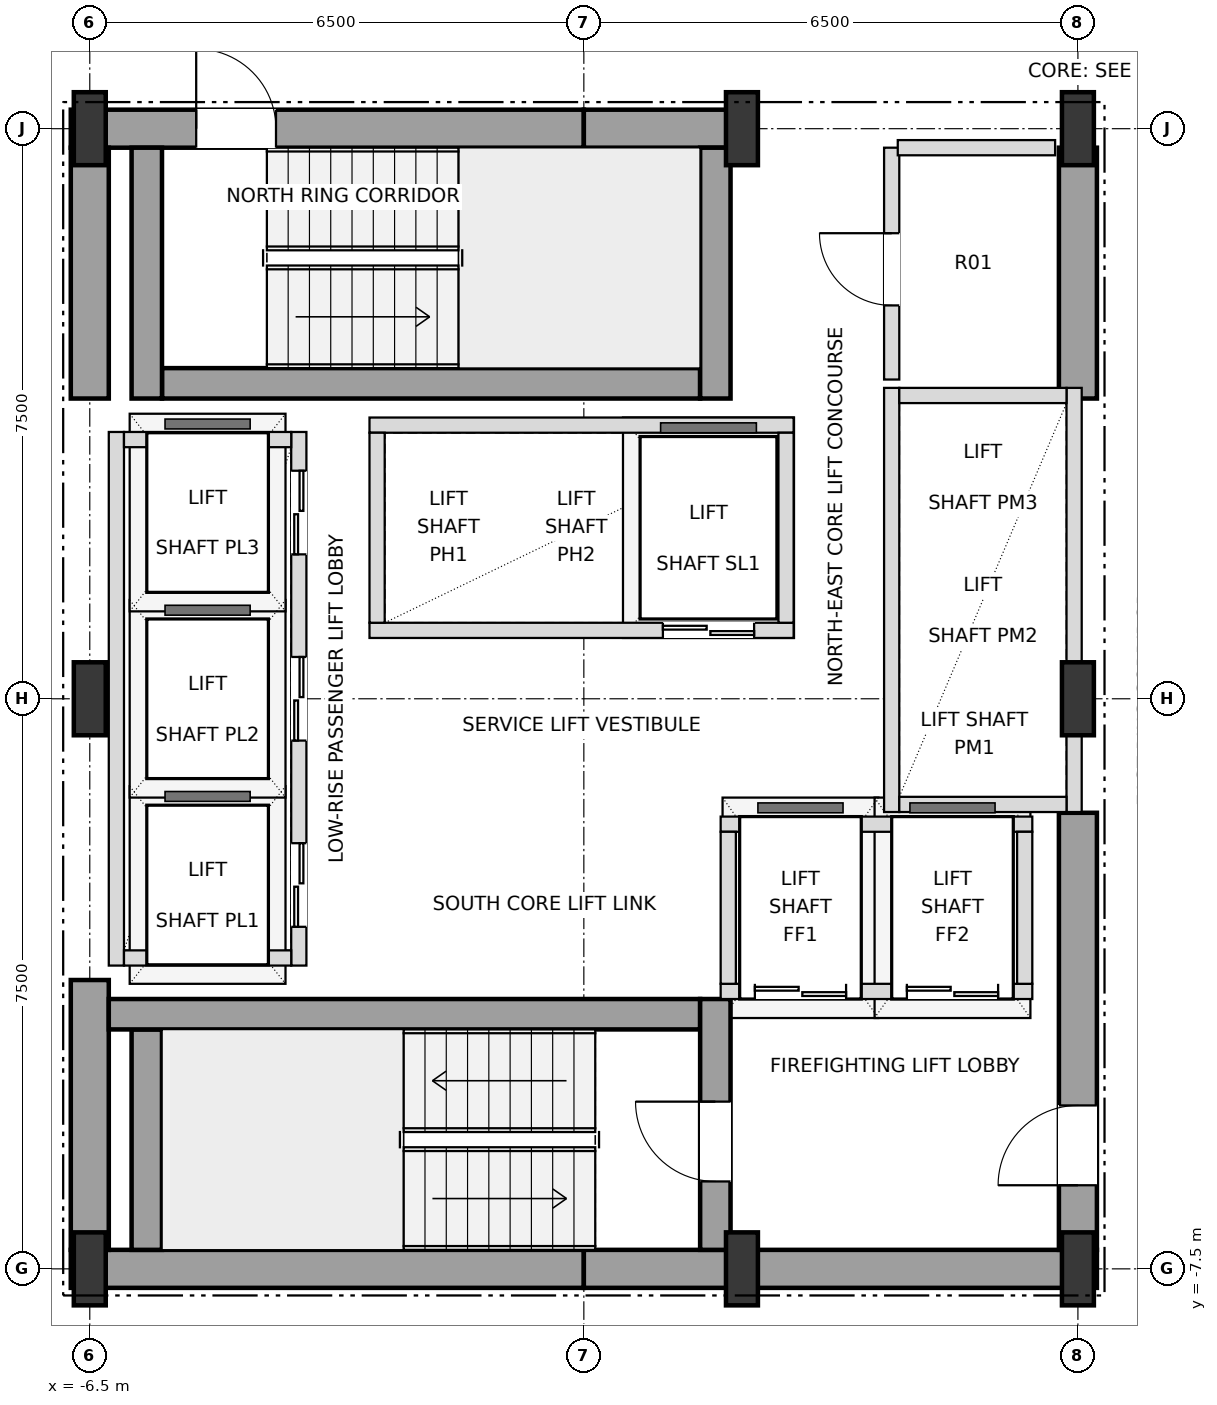
"""IFC4 building model, lengths in metres.
Left out: names, types, materials, properties, quantities, classifications, styles, units other than length and angle.
Written with IfcOpenShell. Run it as: python <this file> out.ifc"""

import sys

from ifc_helpers import new_model, si_unit, direction, frame, frame_2d, origin, origin_2d, place, context, subcontext, project, spatial, rectangle, i_section, extrude, element, fill, save


model = new_model("IFC4")
c1 = context("Model", 3, precision=1e-05, world=origin(), true_north=direction((0.0, 1.0)))
c2 = subcontext(c1, "Body", "Model", "MODEL_VIEW")
j1 = project(units=[si_unit("LENGTHUNIT", "METRE"), si_unit("PLANEANGLEUNIT", "RADIAN")], contexts=[c1])
p1 = place(None, origin())
s1 = spatial("IfcSite", under=j1, at=p1, CompositionType="ELEMENT")
p2 = place(p1, origin())
s2 = spatial("IfcBuilding", under=s1, at=p2, CompositionType="ELEMENT")
p3 = place(p2, frame((0.0, 0.0, 109.8)))
s3 = spatial("IfcBuildingStorey", under=s2, at=p3, CompositionType="ELEMENT", Elevation=109.8)
for number, where, z_axis, x_axis in (
    (1, (-6.5, -7.5, 0.0), (0.0, 0.0, 1.0), (1.0, 0.0, 0.0)),
    (2, (2.08, -7.5, 0.0), (0.0, 0.0, 1.0), (1.0, 0.0, 0.0)),
    (3, (6.5, -7.5, 0.0), (0.0, 0.0, 1.0), (1.0, 0.0, 0.0)),
    (4, (-6.5, 0.0, 0.0), (0.0, 0.0, 1.0), (1.0, 0.0, 0.0)),
    (5, (6.5, 0.0, 0.0), (0.0, 0.0, 1.0), (1.0, 0.0, 0.0)),
    (6, (-6.5, 7.5, 0.0), (0.0, 0.0, 1.0), (1.0, 0.0, 0.0)),
    (7, (2.08, 7.5, 0.0), (0.0, 0.0, 1.0), (1.0, 0.0, 0.0)),
    (8, (6.5, 7.5, 0.0), (0.0, 0.0, 1.0), (1.0, 0.0, 0.0)),
):
    element("IfcColumn", number, at=place(p3, frame(where, z_axis=z_axis, x_axis=x_axis)), inside=s3, PredefinedType="COLUMN", context=c2, shape_type="SweptSolid", body=[
        extrude(i_section(OverallWidth=0.42, OverallDepth=0.96, WebThickness=0.022, FlangeThickness=0.034, at=origin_2d()), origin(), (0.0, 0.0, 1.0), 3.6),
    ])
for number, where, z_axis, x_axis in (
    (9, (-6.75, -7.5, 0.0), (0.0, 0.0, 1.0), (1.0, 0.0, 0.0)),
    (10, (0.0, -7.5, 0.0), (0.0, 0.0, 1.0), (1.0, 0.0, 0.0)),
):
    element("IfcWall", number, at=place(p3, frame(where, z_axis=z_axis, x_axis=x_axis)), inside=s3, PredefinedType="SHEAR", context=c2, shape_type="SweptSolid", body=[
        extrude(rectangle(XDim=6.75, YDim=0.5, at=frame_2d((3.375, 0.0))), origin(), (0.0, 0.0, 1.0), 3.38),
    ])
p4 = place(p3, frame((-6.75, 7.5, 0.0), z_axis=(0.0, 0.0, 1.0), x_axis=(1.0, 0.0, 0.0)))
e11 = element("IfcWall", 11, at=p4, inside=s3, PredefinedType="SHEAR", context=c2, shape_type="SweptSolid", body=[
    extrude(rectangle(XDim=6.75, YDim=0.5, at=frame_2d((3.375, 0.0))), origin(), (0.0, 0.0, 1.0), 3.38),
])
p5 = place(p4, frame((1.65, 0.0, 0.0)))
e12 = element("IfcOpeningElement", 12, at=p5, cuts=e11, PredefinedType="OPENING", context=c2, shape_type="SweptSolid", body=[
    extrude(rectangle(XDim=1.05, YDim=2.15, at=frame_2d((0.525, 1.075))), frame((0.0, 0.26, 0.0), z_axis=(0.0, -1.0, 0.0), x_axis=(1.0, 0.0, 0.0)), (0.0, 0.0, 1.0), 0.52),
])
p6 = place(p3, frame((0.0, 7.5, 0.0), z_axis=(0.0, 0.0, 1.0), x_axis=(1.0, 0.0, 0.0)))
e13 = element("IfcWall", 13, at=p6, inside=s3, PredefinedType="SHEAR", context=c2, shape_type="SweptSolid", body=[
    extrude(rectangle(XDim=2.08, YDim=0.5, at=frame_2d((1.04, 0.0))), origin(), (0.0, 0.0, 1.0), 3.38),
])
p7 = place(p3, frame((-6.5, -7.25, 0.0), z_axis=(0.0, 0.0, 1.0), x_axis=(0.0, 1.0, 0.0)))
e14 = element("IfcWall", 14, at=p7, inside=s3, PredefinedType="SHEAR", context=c2, shape_type="SweptSolid", body=[
    extrude(rectangle(XDim=3.55, YDim=0.5, at=frame_2d((1.775, 0.0))), origin(), (0.0, 0.0, 1.0), 3.38),
])
p8 = place(p3, frame((-6.5, 3.95, 0.0), z_axis=(0.0, 0.0, 1.0), x_axis=(0.0, 1.0, 0.0)))
e15 = element("IfcWall", 15, at=p8, inside=s3, PredefinedType="SHEAR", context=c2, shape_type="SweptSolid", body=[
    extrude(rectangle(XDim=3.3, YDim=0.5, at=frame_2d((1.65, 0.0))), origin(), (0.0, 0.0, 1.0), 3.38),
])
p9 = place(p3, frame((6.5, -7.25, 0.0), z_axis=(0.0, 0.0, 1.0), x_axis=(0.0, 1.0, 0.0)))
e16 = element("IfcWall", 16, at=p9, inside=s3, PredefinedType="SHEAR", context=c2, shape_type="SweptSolid", body=[
    extrude(rectangle(XDim=5.75, YDim=0.5, at=frame_2d((2.875, 0.0))), origin(), (0.0, 0.0, 1.0), 3.38),
])
p10 = place(p9, frame((0.85, 0.0, 0.0)))
e17 = element("IfcOpeningElement", 17, at=p10, cuts=e16, PredefinedType="OPENING", context=c2, shape_type="SweptSolid", body=[
    extrude(rectangle(XDim=1.05, YDim=2.15, at=frame_2d((0.525, 1.075))), frame((0.0, 0.26, 0.0), z_axis=(0.0, -1.0, 0.0), x_axis=(1.0, 0.0, 0.0)), (0.0, 0.0, 1.0), 0.52),
])
p11 = place(p3, frame((6.5, 3.95, 0.0), z_axis=(0.0, 0.0, 1.0), x_axis=(0.0, 1.0, 0.0)))
e18 = element("IfcWall", 18, at=p11, inside=s3, PredefinedType="SHEAR", context=c2, shape_type="SweptSolid", body=[
    extrude(rectangle(XDim=3.3, YDim=0.5, at=frame_2d((1.65, 0.0))), origin(), (0.0, 0.0, 1.0), 3.38),
])
p12 = place(p3, frame((-5.75, -7.25, 0.0), z_axis=(0.0, 0.0, 1.0), x_axis=(0.0, 1.0, 0.0)))
e19 = element("IfcWall", 19, at=p12, inside=s3, PredefinedType="SHEAR", context=c2, shape_type="SweptSolid", body=[
    extrude(rectangle(XDim=2.9, YDim=0.4, at=frame_2d((1.45, 0.0))), origin(), (0.0, 0.0, 1.0), 3.38),
])
p13 = place(p3, frame((-6.25, -4.15, 0.0), z_axis=(0.0, 0.0, 1.0), x_axis=(1.0, 0.0, 0.0)))
e20 = element("IfcWall", 20, at=p13, inside=s3, PredefinedType="SHEAR", context=c2, shape_type="SweptSolid", body=[
    extrude(rectangle(XDim=7.78, YDim=0.4, at=frame_2d((3.89, 0.0))), origin(), (0.0, 0.0, 1.0), 3.38),
])
p14 = place(p3, frame((1.73, -7.25, 0.0), z_axis=(0.0, 0.0, 1.0), x_axis=(0.0, 1.0, 0.0)))
e21 = element("IfcWall", 21, at=p14, inside=s3, PredefinedType="SHEAR", context=c2, shape_type="SweptSolid", body=[
    extrude(rectangle(XDim=3.3, YDim=0.4, at=frame_2d((1.65, 0.0))), origin(), (0.0, 0.0, 1.0), 3.38),
])
p15 = place(p14, frame((0.9, 0.0, 0.0)))
e22 = element("IfcOpeningElement", 22, at=p15, cuts=e21, PredefinedType="OPENING", context=c2, shape_type="SweptSolid", body=[
    extrude(rectangle(XDim=1.05, YDim=2.15, at=frame_2d((0.525, 1.075))), frame((0.0, 0.21, 0.0), z_axis=(0.0, -1.0, 0.0), x_axis=(1.0, 0.0, 0.0)), (0.0, 0.0, 1.0), 0.42),
])
p16 = place(p3, frame((-5.55, 4.15, 0.0), z_axis=(0.0, 0.0, 1.0), x_axis=(1.0, 0.0, 0.0)))
e23 = element("IfcWall", 23, at=p16, inside=s3, PredefinedType="SHEAR", context=c2, shape_type="SweptSolid", body=[
    extrude(rectangle(XDim=7.08, YDim=0.4, at=frame_2d((3.54, 0.0))), origin(), (0.0, 0.0, 1.0), 3.38),
])
for number, where, z_axis, x_axis in (
    (24, (1.73, 3.95, 0.0), (0.0, 0.0, 1.0), (0.0, 1.0, 0.0)),
    (25, (-5.75, 3.95, 0.0), (0.0, 0.0, 1.0), (0.0, 1.0, 0.0)),
):
    element("IfcWall", number, at=place(p3, frame(where, z_axis=z_axis, x_axis=x_axis)), inside=s3, PredefinedType="SHEAR", context=c2, shape_type="SweptSolid", body=[
        extrude(rectangle(XDim=3.3, YDim=0.4, at=frame_2d((1.65, 0.0))), origin(), (0.0, 0.0, 1.0), 3.38),
    ])
p17 = place(p3, frame((-3.75, -3.51, 0.0), z_axis=(0.0, 0.0, 1.0), x_axis=(0.0, 1.0, 0.0)))
e26 = element("IfcWall", 26, at=p17, inside=s3, PredefinedType="SOLIDWALL", context=c2, shape_type="SweptSolid", body=[
    extrude(rectangle(XDim=7.02, YDim=0.2, at=frame_2d((3.51, 0.0))), origin(), (0.0, 0.0, 1.0), 3.38),
])
p18 = place(p17, frame((0.51, 0.0, 0.0)))
e27 = element("IfcOpeningElement", 27, at=p18, cuts=e26, PredefinedType="OPENING", context=c2, shape_type="SweptSolid", body=[
    extrude(rectangle(XDim=1.1, YDim=2.15, at=frame_2d((0.55, 1.075))), frame((0.0, 0.11, 0.0), z_axis=(0.0, -1.0, 0.0), x_axis=(1.0, 0.0, 0.0)), (0.0, 0.0, 1.0), 0.22),
])
p19 = place(p17, frame((2.96, 0.0, 0.0)))
e28 = element("IfcOpeningElement", 28, at=p19, cuts=e26, PredefinedType="OPENING", context=c2, shape_type="SweptSolid", body=[
    extrude(rectangle(XDim=1.1, YDim=2.15, at=frame_2d((0.55, 1.075))), frame((0.0, 0.11, 0.0), z_axis=(0.0, -1.0, 0.0), x_axis=(1.0, 0.0, 0.0)), (0.0, 0.0, 1.0), 0.22),
])
p20 = place(p17, frame((5.41, 0.0, 0.0)))
e29 = element("IfcOpeningElement", 29, at=p20, cuts=e26, PredefinedType="OPENING", context=c2, shape_type="SweptSolid", body=[
    extrude(rectangle(XDim=1.1, YDim=2.15, at=frame_2d((0.55, 1.075))), frame((0.0, 0.11, 0.0), z_axis=(0.0, -1.0, 0.0), x_axis=(1.0, 0.0, 0.0)), (0.0, 0.0, 1.0), 0.22),
])
p21 = place(p3, frame((-6.15, -3.51, 0.0), z_axis=(0.0, 0.0, 1.0), x_axis=(0.0, 1.0, 0.0)))
e30 = element("IfcWall", 30, at=p21, inside=s3, PredefinedType="SOLIDWALL", context=c2, shape_type="SweptSolid", body=[
    extrude(rectangle(XDim=7.02, YDim=0.2, at=frame_2d((3.51, 0.0))), origin(), (0.0, 0.0, 1.0), 3.38),
])
for number, where, z_axis, x_axis in (
    (31, (-6.05, -3.41, 0.0), (0.0, 0.0, 1.0), (1.0, 0.0, 0.0)),
    (32, (-6.05, 3.41, 0.0), (0.0, 0.0, 1.0), (1.0, 0.0, 0.0)),
):
    element("IfcWall", number, at=place(p3, frame(where, z_axis=z_axis, x_axis=x_axis)), inside=s3, PredefinedType="SOLIDWALL", context=c2, shape_type="SweptSolid", body=[
        extrude(rectangle(XDim=2.2, YDim=0.2, at=frame_2d((1.1, 0.0))), origin(), (0.0, 0.0, 1.0), 3.38),
    ])
p22 = place(p3, frame((4.05, -1.49, 0.0), z_axis=(0.0, 0.0, 1.0), x_axis=(0.0, 1.0, 0.0)))
e33 = element("IfcWall", 33, at=p22, inside=s3, PredefinedType="SOLIDWALL", context=c2, shape_type="SweptSolid", body=[
    extrude(rectangle(XDim=5.58, YDim=0.2, at=frame_2d((2.79, 0.0))), origin(), (0.0, 0.0, 1.0), 3.38),
])
p23 = place(p3, frame((6.45, -1.49, 0.0), z_axis=(0.0, 0.0, 1.0), x_axis=(0.0, 1.0, 0.0)))
e34 = element("IfcWall", 34, at=p23, inside=s3, PredefinedType="SOLIDWALL", context=c2, shape_type="SweptSolid", body=[
    extrude(rectangle(XDim=5.58, YDim=0.2, at=frame_2d((2.79, 0.0))), origin(), (0.0, 0.0, 1.0), 2.816),
])
for number, where, z_axis, x_axis in (
    (35, (4.15, -1.39, 0.0), (0.0, 0.0, 1.0), (1.0, 0.0, 0.0)),
    (36, (4.15, 3.99, 0.0), (0.0, 0.0, 1.0), (1.0, 0.0, 0.0)),
):
    element("IfcWall", number, at=place(p3, frame(where, z_axis=z_axis, x_axis=x_axis)), inside=s3, PredefinedType="SOLIDWALL", context=c2, shape_type="SweptSolid", body=[
        extrude(rectangle(XDim=2.2, YDim=0.2, at=frame_2d((1.1, 0.0))), origin(), (0.0, 0.0, 1.0), 3.38),
    ])
p24 = place(p3, frame((-2.82, 0.9, 0.0), z_axis=(0.0, 0.0, 1.0), x_axis=(1.0, 0.0, 0.0)))
e37 = element("IfcWall", 37, at=p24, inside=s3, PredefinedType="SOLIDWALL", context=c2, shape_type="SweptSolid", body=[
    extrude(rectangle(XDim=5.58, YDim=0.2, at=frame_2d((2.79, 0.0))), origin(), (0.0, 0.0, 1.0), 3.38),
])
p25 = place(p24, frame((3.86, 0.0, 0.0)))
e38 = element("IfcOpeningElement", 38, at=p25, cuts=e37, PredefinedType="OPENING", context=c2, shape_type="SweptSolid", body=[
    extrude(rectangle(XDim=1.2, YDim=2.2, at=frame_2d((0.6, 1.1))), frame((0.0, 0.11, 0.0), z_axis=(0.0, -1.0, 0.0), x_axis=(1.0, 0.0, 0.0)), (0.0, 0.0, 1.0), 0.22),
])
p26 = place(p3, frame((-2.82, 3.6, 0.0), z_axis=(0.0, 0.0, 1.0), x_axis=(1.0, 0.0, 0.0)))
e39 = element("IfcWall", 39, at=p26, inside=s3, PredefinedType="SOLIDWALL", context=c2, shape_type="SweptSolid", body=[
    extrude(rectangle(XDim=5.58, YDim=0.2, at=frame_2d((2.79, 0.0))), origin(), (0.0, 0.0, 1.0), 3.38),
])
for number, where, z_axis, x_axis in (
    (40, (-2.72, 1.0, 0.0), (0.0, 0.0, 1.0), (0.0, 1.0, 0.0)),
    (41, (2.66, 1.0, 0.0), (0.0, 0.0, 1.0), (0.0, 1.0, 0.0)),
):
    element("IfcWall", number, at=place(p3, frame(where, z_axis=z_axis, x_axis=x_axis)), inside=s3, PredefinedType="SOLIDWALL", context=c2, shape_type="SweptSolid", body=[
        extrude(rectangle(XDim=2.5, YDim=0.2, at=frame_2d((1.25, 0.0))), origin(), (0.0, 0.0, 1.0), 3.38),
    ])
p27 = place(p3, frame((1.8, -3.85, 0.0), z_axis=(0.0, 0.0, 1.0), x_axis=(1.0, 0.0, 0.0)))
e42 = element("IfcWall", 42, at=p27, inside=s3, PredefinedType="SOLIDWALL", context=c2, shape_type="SweptSolid", body=[
    extrude(rectangle(XDim=4.1, YDim=0.2, at=frame_2d((2.05, 0.0))), origin(), (0.0, 0.0, 1.0), 3.38),
])
p28 = place(p27, frame((0.45, 0.0, 0.0)))
e43 = element("IfcOpeningElement", 43, at=p28, cuts=e42, PredefinedType="OPENING", context=c2, shape_type="SweptSolid", body=[
    extrude(rectangle(XDim=1.2, YDim=2.2, at=frame_2d((0.6, 1.1))), frame((0.0, 0.11, 0.0), z_axis=(0.0, -1.0, 0.0), x_axis=(1.0, 0.0, 0.0)), (0.0, 0.0, 1.0), 0.22),
])
p29 = place(p27, frame((2.45, 0.0, 0.0)))
e44 = element("IfcOpeningElement", 44, at=p29, cuts=e42, PredefinedType="OPENING", context=c2, shape_type="SweptSolid", body=[
    extrude(rectangle(XDim=1.2, YDim=2.2, at=frame_2d((0.6, 1.1))), frame((0.0, 0.11, 0.0), z_axis=(0.0, -1.0, 0.0), x_axis=(1.0, 0.0, 0.0)), (0.0, 0.0, 1.0), 0.22),
])
p30 = place(p3, frame((1.8, -1.65, 0.0), z_axis=(0.0, 0.0, 1.0), x_axis=(1.0, 0.0, 0.0)))
e45 = element("IfcWall", 45, at=p30, inside=s3, PredefinedType="SOLIDWALL", context=c2, shape_type="SweptSolid", body=[
    extrude(rectangle(XDim=4.1, YDim=0.2, at=frame_2d((2.05, 0.0))), origin(), (0.0, 0.0, 1.0), 3.38),
])
for number, where, z_axis, x_axis in (
    (46, (1.9, -3.75, 0.0), (0.0, 0.0, 1.0), (0.0, 1.0, 0.0)),
    (47, (5.8, -3.75, 0.0), (0.0, 0.0, 1.0), (0.0, 1.0, 0.0)),
):
    element("IfcWall", number, at=place(p3, frame(where, z_axis=z_axis, x_axis=x_axis)), inside=s3, PredefinedType="SOLIDWALL", context=c2, shape_type="SweptSolid", body=[
        extrude(rectangle(XDim=2.0, YDim=0.2, at=frame_2d((1.0, 0.0))), origin(), (0.0, 0.0, 1.0), 3.38),
    ])
p31 = place(p3, frame((4.05, 4.2, 0.0), z_axis=(0.0, 0.0, 1.0), x_axis=(0.0, 1.0, 0.0)))
e48 = element("IfcWall", 48, at=p31, inside=s3, PredefinedType="SOLIDWALL", context=c2, shape_type="SweptSolid", body=[
    extrude(rectangle(XDim=3.05, YDim=0.2, at=frame_2d((1.525, 0.0))), origin(), (0.0, 0.0, 1.0), 3.38),
])
p32 = place(p31, frame((0.975, 0.0, 0.0)))
e49 = element("IfcOpeningElement", 49, at=p32, cuts=e48, PredefinedType="OPENING", context=c2, shape_type="SweptSolid", body=[
    extrude(rectangle(XDim=0.95, YDim=2.15, at=frame_2d((0.475, 1.075))), frame((0.0, 0.11, 0.0), z_axis=(0.0, -1.0, 0.0), x_axis=(1.0, 0.0, 0.0)), (0.0, 0.0, 1.0), 0.22),
])
p33 = place(p3, frame((4.13, 7.25, 0.0), z_axis=(0.0, 0.0, 1.0), x_axis=(1.0, 0.0, 0.0)))
e50 = element("IfcWall", 50, at=p33, inside=s3, PredefinedType="SOLIDWALL", context=c2, shape_type="SweptSolid", body=[
    extrude(rectangle(XDim=2.07, YDim=0.2, at=frame_2d((1.035, 0.0))), origin(), (0.0, 0.0, 1.0), 3.38),
])
p34 = place(p10, origin())
e51 = element("IfcDoor", 51, at=p34, inside=s3, OperationType="SINGLE_SWING_LEFT", PredefinedType="DOOR", context=c2, shape_type="SweptSolid", body=[
    extrude(rectangle(XDim=1.05, YDim=2.15, at=frame_2d((0.525, 1.075))), frame((0.0, 0.025, 0.0), z_axis=(0.0, -1.0, 0.0), x_axis=(1.0, 0.0, 0.0)), (0.0, 0.0, 1.0), 0.05),
])
fill(e17, e51)
p35 = place(p15, origin())
e52 = element("IfcDoor", 52, at=p35, inside=s3, OperationType="SINGLE_SWING_RIGHT", PredefinedType="DOOR", context=c2, shape_type="SweptSolid", body=[
    extrude(rectangle(XDim=1.05, YDim=2.15, at=frame_2d((0.525, 1.075))), frame((0.0, 0.025, 0.0), z_axis=(0.0, -1.0, 0.0), x_axis=(1.0, 0.0, 0.0)), (0.0, 0.0, 1.0), 0.05),
])
fill(e22, e52)
p36 = place(p5, origin())
e53 = element("IfcDoor", 53, at=p36, inside=s3, OperationType="SINGLE_SWING_LEFT", PredefinedType="DOOR", context=c2, shape_type="SweptSolid", body=[
    extrude(rectangle(XDim=1.05, YDim=2.15, at=frame_2d((0.525, 1.075))), frame((0.0, 0.025, 0.0), z_axis=(0.0, -1.0, 0.0), x_axis=(1.0, 0.0, 0.0)), (0.0, 0.0, 1.0), 0.05),
])
fill(e12, e53)
p37 = place(p18, origin())
e54 = element("IfcDoor", 54, at=p37, inside=s3, OperationType="DOUBLE_DOOR_SLIDING", PredefinedType="DOOR", context=c2, shape_type="SweptSolid", body=[
    extrude(rectangle(XDim=1.1, YDim=2.15, at=frame_2d((0.55, 1.075))), frame((0.0, 0.025, 0.0), z_axis=(0.0, -1.0, 0.0), x_axis=(1.0, 0.0, 0.0)), (0.0, 0.0, 1.0), 0.05),
])
fill(e27, e54)
p38 = place(p19, origin())
e55 = element("IfcDoor", 55, at=p38, inside=s3, OperationType="DOUBLE_DOOR_SLIDING", PredefinedType="DOOR", context=c2, shape_type="SweptSolid", body=[
    extrude(rectangle(XDim=1.1, YDim=2.15, at=frame_2d((0.55, 1.075))), frame((0.0, 0.025, 0.0), z_axis=(0.0, -1.0, 0.0), x_axis=(1.0, 0.0, 0.0)), (0.0, 0.0, 1.0), 0.05),
])
fill(e28, e55)
p39 = place(p20, origin())
e56 = element("IfcDoor", 56, at=p39, inside=s3, OperationType="DOUBLE_DOOR_SLIDING", PredefinedType="DOOR", context=c2, shape_type="SweptSolid", body=[
    extrude(rectangle(XDim=1.1, YDim=2.15, at=frame_2d((0.55, 1.075))), frame((0.0, 0.025, 0.0), z_axis=(0.0, -1.0, 0.0), x_axis=(1.0, 0.0, 0.0)), (0.0, 0.0, 1.0), 0.05),
])
fill(e29, e56)
p40 = place(p25, origin())
e57 = element("IfcDoor", 57, at=p40, inside=s3, OperationType="DOUBLE_DOOR_SLIDING", PredefinedType="DOOR", context=c2, shape_type="SweptSolid", body=[
    extrude(rectangle(XDim=1.2, YDim=2.2, at=frame_2d((0.6, 1.1))), frame((0.0, 0.025, 0.0), z_axis=(0.0, -1.0, 0.0), x_axis=(1.0, 0.0, 0.0)), (0.0, 0.0, 1.0), 0.05),
])
fill(e38, e57)
p41 = place(p28, origin())
e58 = element("IfcDoor", 58, at=p41, inside=s3, OperationType="DOUBLE_DOOR_SLIDING", PredefinedType="DOOR", context=c2, shape_type="SweptSolid", body=[
    extrude(rectangle(XDim=1.2, YDim=2.2, at=frame_2d((0.6, 1.1))), frame((0.0, 0.025, 0.0), z_axis=(0.0, -1.0, 0.0), x_axis=(1.0, 0.0, 0.0)), (0.0, 0.0, 1.0), 0.05),
])
fill(e43, e58)
p42 = place(p29, origin())
e59 = element("IfcDoor", 59, at=p42, inside=s3, OperationType="DOUBLE_DOOR_SLIDING", PredefinedType="DOOR", context=c2, shape_type="SweptSolid", body=[
    extrude(rectangle(XDim=1.2, YDim=2.2, at=frame_2d((0.6, 1.1))), frame((0.0, 0.025, 0.0), z_axis=(0.0, -1.0, 0.0), x_axis=(1.0, 0.0, 0.0)), (0.0, 0.0, 1.0), 0.05),
])
fill(e44, e59)
p43 = place(p32, origin())
e60 = element("IfcDoor", 60, at=p43, inside=s3, OperationType="SINGLE_SWING_RIGHT", PredefinedType="DOOR", context=c2, shape_type="SweptSolid", body=[
    extrude(rectangle(XDim=0.95, YDim=2.15, at=frame_2d((0.475, 1.075))), frame((0.0, 0.025, 0.0), z_axis=(0.0, -1.0, 0.0), x_axis=(1.0, 0.0, 0.0)), (0.0, 0.0, 1.0), 0.05),
])
fill(e49, e60)
save(model, sys.argv[1])
